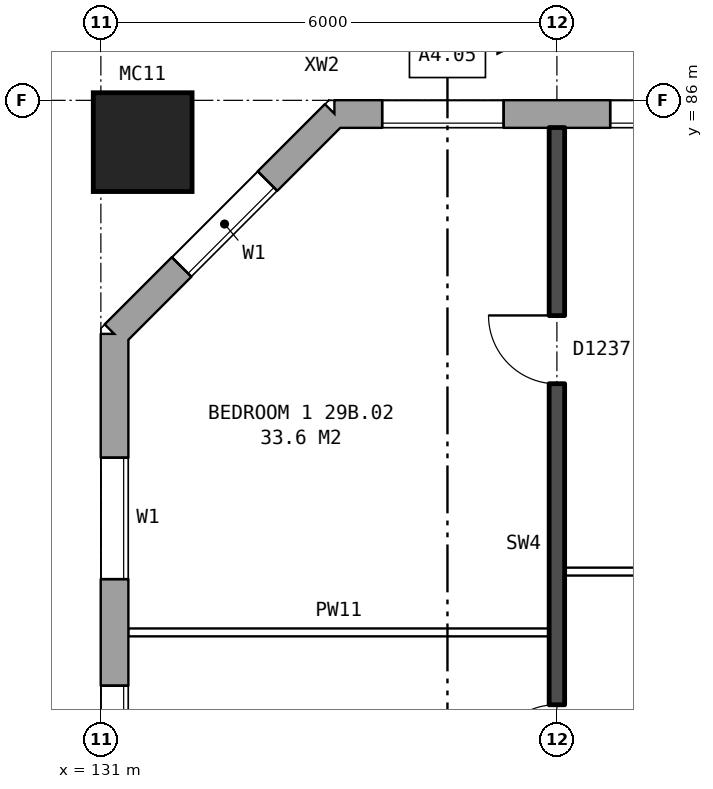
"""IFC4 building model, lengths in metres.
Left out: names, types, materials, properties, quantities, classifications, styles, units other than length and angle.
Written with IfcOpenShell. Run it as: python <this file> out.ifc"""

import sys

from ifc_helpers import new_model, si_unit, direction, frame, frame_2d, origin, origin_2d, place, context, subcontext, project, spatial, rectangle, hollow_rectangle, extrude, element, fill, save


model = new_model("IFC4")
c1 = context("Model", 3, precision=1e-05, world=origin(), true_north=direction((0.0, 1.0)))
c2 = subcontext(c1, "Body", "Model", "MODEL_VIEW")
j1 = project(units=[si_unit("LENGTHUNIT", "METRE"), si_unit("PLANEANGLEUNIT", "RADIAN")], contexts=[c1])
p1 = place(None, origin())
s1 = spatial("IfcSite", under=j1, at=p1, CompositionType="ELEMENT")
p2 = place(p1, origin())
s2 = spatial("IfcBuilding", under=s1, at=p2, CompositionType="ELEMENT")
p3 = place(p2, frame((0.0, 0.0, 105.7)))
s3 = spatial("IfcBuildingStorey", under=s2, at=p3, CompositionType="ELEMENT", Elevation=105.7)
p4 = place(p3, frame((131.55, 85.45, 0.0), z_axis=(0.0, 0.0, 1.0), x_axis=(1.0, 0.0, 0.0)))
e1 = element("IfcColumn", 1, at=p4, inside=s3, PredefinedType="COLUMN", context=c2, shape_type="SweptSolid", body=[
    extrude(hollow_rectangle(XDim=1.3, YDim=1.3, WallThickness=0.07, at=origin_2d()), origin(), (0.0, 0.0, 1.0), 3.1),
])
p5 = place(p3, frame((170.925, 85.82, 0.0), z_axis=(0.0, 0.0, 1.0), x_axis=(-1.0, 0.0, 0.0)))
e2 = element("IfcWall", 2, at=p5, inside=s3, PredefinedType="STANDARD", context=c2, shape_type="SweptSolid", body=[
    extrude(rectangle(XDim=36.851, YDim=0.36, at=frame_2d((18.425, 0.0))), origin(), (0.0, 0.0, 1.0), 2.85),
])
p6 = place(p5, frame((1.625, 0.0, 0.8)))
e3 = element("IfcOpeningElement", 3, at=p6, cuts=e2, PredefinedType="OPENING", context=c2, shape_type="SweptSolid", body=[
    extrude(rectangle(XDim=1.6, YDim=1.8, at=frame_2d((0.8, 0.9))), frame((0.0, 0.19, 0.0), z_axis=(0.0, -1.0, 0.0), x_axis=(1.0, 0.0, 0.0)), (0.0, 0.0, 1.0), 0.38),
])
p7 = place(p5, frame((4.625, 0.0, 0.8)))
e4 = element("IfcOpeningElement", 4, at=p7, cuts=e2, PredefinedType="OPENING", context=c2, shape_type="SweptSolid", body=[
    extrude(rectangle(XDim=1.6, YDim=1.8, at=frame_2d((0.8, 0.9))), frame((0.0, 0.19, 0.0), z_axis=(0.0, -1.0, 0.0), x_axis=(1.0, 0.0, 0.0)), (0.0, 0.0, 1.0), 0.38),
])
p8 = place(p5, frame((6.525, 0.0, 0.8)))
e5 = element("IfcOpeningElement", 5, at=p8, cuts=e2, PredefinedType="OPENING", context=c2, shape_type="SweptSolid", body=[
    extrude(rectangle(XDim=1.4, YDim=1.8, at=frame_2d((0.7, 0.9))), frame((0.0, 0.19, 0.0), z_axis=(0.0, -1.0, 0.0), x_axis=(1.0, 0.0, 0.0)), (0.0, 0.0, 1.0), 0.38),
])
p9 = place(p5, frame((10.675, 0.0, 0.8)))
e6 = element("IfcOpeningElement", 6, at=p9, cuts=e2, PredefinedType="OPENING", context=c2, shape_type="SweptSolid", body=[
    extrude(rectangle(XDim=0.6, YDim=0.9, at=frame_2d((0.3, 0.45))), frame((0.0, 0.19, 0.0), z_axis=(0.0, -1.0, 0.0), x_axis=(1.0, 0.0, 0.0)), (0.0, 0.0, 1.0), 0.38),
])
p10 = place(p5, frame((13.625, 0.0, 0.8)))
e7 = element("IfcOpeningElement", 7, at=p10, cuts=e2, PredefinedType="OPENING", context=c2, shape_type="SweptSolid", body=[
    extrude(rectangle(XDim=1.6, YDim=1.8, at=frame_2d((0.8, 0.9))), frame((0.0, 0.19, 0.0), z_axis=(0.0, -1.0, 0.0), x_axis=(1.0, 0.0, 0.0)), (0.0, 0.0, 1.0), 0.38),
])
p11 = place(p5, frame((16.625, 0.0, 0.8)))
e8 = element("IfcOpeningElement", 8, at=p11, cuts=e2, PredefinedType="OPENING", context=c2, shape_type="SweptSolid", body=[
    extrude(rectangle(XDim=1.6, YDim=1.8, at=frame_2d((0.8, 0.9))), frame((0.0, 0.19, 0.0), z_axis=(0.0, -1.0, 0.0), x_axis=(1.0, 0.0, 0.0)), (0.0, 0.0, 1.0), 0.38),
])
p12 = place(p5, frame((19.625, 0.0, 0.8)))
e9 = element("IfcOpeningElement", 9, at=p12, cuts=e2, PredefinedType="OPENING", context=c2, shape_type="SweptSolid", body=[
    extrude(rectangle(XDim=1.6, YDim=1.8, at=frame_2d((0.8, 0.9))), frame((0.0, 0.19, 0.0), z_axis=(0.0, -1.0, 0.0), x_axis=(1.0, 0.0, 0.0)), (0.0, 0.0, 1.0), 0.38),
])
p13 = place(p5, frame((22.625, 0.0, 0.8)))
e10 = element("IfcOpeningElement", 10, at=p13, cuts=e2, PredefinedType="OPENING", context=c2, shape_type="SweptSolid", body=[
    extrude(rectangle(XDim=1.6, YDim=1.8, at=frame_2d((0.8, 0.9))), frame((0.0, 0.19, 0.0), z_axis=(0.0, -1.0, 0.0), x_axis=(1.0, 0.0, 0.0)), (0.0, 0.0, 1.0), 0.38),
])
p14 = place(p5, frame((25.075, 0.0, 0.15)))
e11 = element("IfcOpeningElement", 11, at=p14, cuts=e2, PredefinedType="OPENING", context=c2, shape_type="SweptSolid", body=[
    extrude(rectangle(XDim=0.8, YDim=1.8, at=frame_2d((0.4, 0.9))), frame((0.0, 0.19, 0.0), z_axis=(0.0, -1.0, 0.0), x_axis=(1.0, 0.0, 0.0)), (0.0, 0.0, 1.0), 0.38),
])
p15 = place(p5, frame((28.625, 0.0, 0.8)))
e12 = element("IfcOpeningElement", 12, at=p15, cuts=e2, PredefinedType="OPENING", context=c2, shape_type="SweptSolid", body=[
    extrude(rectangle(XDim=1.6, YDim=1.8, at=frame_2d((0.8, 0.9))), frame((0.0, 0.19, 0.0), z_axis=(0.0, -1.0, 0.0), x_axis=(1.0, 0.0, 0.0)), (0.0, 0.0, 1.0), 0.38),
])
p16 = place(p5, frame((31.625, 0.0, 0.8)))
e13 = element("IfcOpeningElement", 13, at=p16, cuts=e2, PredefinedType="OPENING", context=c2, shape_type="SweptSolid", body=[
    extrude(rectangle(XDim=1.6, YDim=1.8, at=frame_2d((0.8, 0.9))), frame((0.0, 0.19, 0.0), z_axis=(0.0, -1.0, 0.0), x_axis=(1.0, 0.0, 0.0)), (0.0, 0.0, 1.0), 0.38),
])
p17 = place(p5, frame((34.625, 0.0, 0.8)))
e14 = element("IfcOpeningElement", 14, at=p17, cuts=e2, PredefinedType="OPENING", context=c2, shape_type="SweptSolid", body=[
    extrude(rectangle(XDim=1.6, YDim=1.8, at=frame_2d((0.8, 0.9))), frame((0.0, 0.19, 0.0), z_axis=(0.0, -1.0, 0.0), x_axis=(1.0, 0.0, 0.0)), (0.0, 0.0, 1.0), 0.38),
])
p18 = place(p5, frame((8.225, 0.0, 1.4)))
e15 = element("IfcOpeningElement", 15, at=p18, cuts=e2, PredefinedType="OPENING", context=c2, shape_type="SweptSolid", body=[
    extrude(rectangle(XDim=1.0, YDim=1.2, at=frame_2d((0.5, 0.6))), frame((0.0, 0.19, 0.0), z_axis=(0.0, -1.0, 0.0), x_axis=(1.0, 0.0, 0.0)), (0.0, 0.0, 1.0), 0.38),
])
p19 = place(p5, frame((11.725, 0.0, 0.8)))
e16 = element("IfcOpeningElement", 16, at=p19, cuts=e2, PredefinedType="OPENING", context=c2, shape_type="SweptSolid", body=[
    extrude(rectangle(XDim=1.6, YDim=1.8, at=frame_2d((0.8, 0.9))), frame((0.0, 0.19, 0.0), z_axis=(0.0, -1.0, 0.0), x_axis=(1.0, 0.0, 0.0)), (0.0, 0.0, 1.0), 0.38),
])
p20 = place(p5, frame((26.175, 0.0, 0.25)))
e17 = element("IfcOpeningElement", 17, at=p20, cuts=e2, PredefinedType="OPENING", context=c2, shape_type="SweptSolid", body=[
    extrude(rectangle(XDim=0.6, YDim=0.9, at=frame_2d((0.3, 0.45))), frame((0.0, 0.19, 0.0), z_axis=(0.0, -1.0, 0.0), x_axis=(1.0, 0.0, 0.0)), (0.0, 0.0, 1.0), 0.38),
])
p21 = place(p3, frame((134.075, 85.82, 0.0), z_axis=(0.0, 0.0, 1.0), x_axis=(-0.707106781187, -0.707106781187, 0.0)))
e18 = element("IfcWall", 18, at=p21, inside=s3, PredefinedType="STANDARD", context=c2, shape_type="SweptSolid", body=[
    extrude(rectangle(XDim=4.094, YDim=0.36, at=frame_2d((2.047, 0.0))), origin(), (0.0, 0.0, 1.0), 2.85),
])
p22 = place(p21, frame((1.247, 0.0, 0.8)))
e19 = element("IfcOpeningElement", 19, at=p22, cuts=e18, PredefinedType="OPENING", context=c2, shape_type="SweptSolid", body=[
    extrude(rectangle(XDim=1.6, YDim=1.8, at=frame_2d((0.8, 0.9))), frame((0.0, 0.19, 0.0), z_axis=(0.0, -1.0, 0.0), x_axis=(1.0, 0.0, 0.0)), (0.0, 0.0, 1.0), 0.38),
])
p23 = place(p3, frame((131.18, 82.925, 0.0), z_axis=(0.0, 0.0, 1.0), x_axis=(0.0, -1.0, 0.0)))
e20 = element("IfcWall", 20, at=p23, inside=s3, PredefinedType="STANDARD", context=c2, shape_type="SweptSolid", body=[
    extrude(rectangle(XDim=25.851, YDim=0.36, at=frame_2d((12.925, 0.0))), origin(), (0.0, 0.0, 1.0), 2.85),
])
p24 = place(p23, frame((1.625, 0.0, 0.8)))
e21 = element("IfcOpeningElement", 21, at=p24, cuts=e20, PredefinedType="OPENING", context=c2, shape_type="SweptSolid", body=[
    extrude(rectangle(XDim=1.6, YDim=1.8, at=frame_2d((0.8, 0.9))), frame((0.0, 0.19, 0.0), z_axis=(0.0, -1.0, 0.0), x_axis=(1.0, 0.0, 0.0)), (0.0, 0.0, 1.0), 0.38),
])
p25 = place(p23, frame((4.625, 0.0, 0.8)))
e22 = element("IfcOpeningElement", 22, at=p25, cuts=e20, PredefinedType="OPENING", context=c2, shape_type="SweptSolid", body=[
    extrude(rectangle(XDim=1.6, YDim=1.8, at=frame_2d((0.8, 0.9))), frame((0.0, 0.19, 0.0), z_axis=(0.0, -1.0, 0.0), x_axis=(1.0, 0.0, 0.0)), (0.0, 0.0, 1.0), 0.38),
])
p26 = place(p23, frame((19.625, 0.0, 0.8)))
e23 = element("IfcOpeningElement", 23, at=p26, cuts=e20, PredefinedType="OPENING", context=c2, shape_type="SweptSolid", body=[
    extrude(rectangle(XDim=1.6, YDim=1.8, at=frame_2d((0.8, 0.9))), frame((0.0, 0.19, 0.0), z_axis=(0.0, -1.0, 0.0), x_axis=(1.0, 0.0, 0.0)), (0.0, 0.0, 1.0), 0.38),
])
p27 = place(p23, frame((22.625, 0.0, 0.8)))
e24 = element("IfcOpeningElement", 24, at=p27, cuts=e20, PredefinedType="OPENING", context=c2, shape_type="SweptSolid", body=[
    extrude(rectangle(XDim=1.6, YDim=1.8, at=frame_2d((0.8, 0.9))), frame((0.0, 0.19, 0.0), z_axis=(0.0, -1.0, 0.0), x_axis=(1.0, 0.0, 0.0)), (0.0, 0.0, 1.0), 0.38),
])
p28 = place(p3, frame((131.36, 79.0, 0.0), z_axis=(0.0, 0.0, 1.0), x_axis=(1.0, 0.0, 0.0)))
e25 = element("IfcWall", 25, at=p28, inside=s3, PredefinedType="PARTITIONING", context=c2, shape_type="SweptSolid", body=[
    extrude(rectangle(XDim=5.54, YDim=0.1, at=frame_2d((2.77, 0.0))), origin(), (0.0, 0.0, 1.0), 2.85),
])
p29 = place(p3, frame((137.1, 79.8, 0.0), z_axis=(0.0, 0.0, 1.0), x_axis=(1.0, 0.0, 0.0)))
e26 = element("IfcWall", 26, at=p29, inside=s3, PredefinedType="PARTITIONING", context=c2, shape_type="SweptSolid", body=[
    extrude(rectangle(XDim=5.8, YDim=0.1, at=frame_2d((2.9, 0.0))), origin(), (0.0, 0.0, 1.0), 2.85),
])
p30 = place(p29, frame((1.3, 0.0, 0.0)))
e27 = element("IfcOpeningElement", 27, at=p30, cuts=e26, PredefinedType="OPENING", context=c2, shape_type="SweptSolid", body=[
    extrude(rectangle(XDim=0.9, YDim=2.1, at=frame_2d((0.45, 1.05))), frame((0.0, 0.06, 0.0), z_axis=(0.0, -1.0, 0.0), x_axis=(1.0, 0.0, 0.0)), (0.0, 0.0, 1.0), 0.12),
])
p31 = place(p29, frame((4.2, 0.0, 0.0)))
e28 = element("IfcOpeningElement", 28, at=p31, cuts=e26, PredefinedType="OPENING", context=c2, shape_type="SweptSolid", body=[
    extrude(rectangle(XDim=0.9, YDim=2.1, at=frame_2d((0.45, 1.05))), frame((0.0, 0.06, 0.0), z_axis=(0.0, -1.0, 0.0), x_axis=(1.0, 0.0, 0.0)), (0.0, 0.0, 1.0), 0.12),
])
p32 = place(p3, frame((137.0, 76.2, 0.0), z_axis=(0.0, 0.0, 1.0), x_axis=(0.0, 1.0, 0.0)))
e29 = element("IfcWall", 29, at=p32, inside=s3, PredefinedType="SOLIDWALL", context=c2, shape_type="SweptSolid", body=[
    extrude(rectangle(XDim=9.44, YDim=0.2, at=frame_2d((4.72, 0.0))), origin(), (0.0, 0.0, 1.0), 2.85),
])
p33 = place(p32, frame((6.07, 0.0, 0.0)))
e30 = element("IfcOpeningElement", 30, at=p33, cuts=e29, PredefinedType="OPENING", context=c2, shape_type="SweptSolid", body=[
    extrude(rectangle(XDim=0.9, YDim=2.1, at=frame_2d((0.45, 1.05))), frame((0.0, 0.11, 0.0), z_axis=(0.0, -1.0, 0.0), x_axis=(1.0, 0.0, 0.0)), (0.0, 0.0, 1.0), 0.22),
])
p34 = place(p32, frame((0.95, 0.0, 0.0)))
e31 = element("IfcOpeningElement", 31, at=p34, cuts=e29, PredefinedType="OPENING", context=c2, shape_type="SweptSolid", body=[
    extrude(rectangle(XDim=0.9, YDim=2.1, at=frame_2d((0.45, 1.05))), frame((0.0, 0.11, 0.0), z_axis=(0.0, -1.0, 0.0), x_axis=(1.0, 0.0, 0.0)), (0.0, 0.0, 1.0), 0.22),
])
p35 = place(p16, origin())
e32 = element("IfcWindow", 32, at=p35, inside=s3, PartitioningType="SINGLE_PANEL", PredefinedType="WINDOW", context=c2, shape_type="SweptSolid", body=[
    extrude(rectangle(XDim=1.6, YDim=1.8, at=frame_2d((0.8, 0.9))), frame((0.0, 0.15, 0.0), z_axis=(0.0, -1.0, 0.0), x_axis=(1.0, 0.0, 0.0)), (0.0, 0.0, 1.0), 0.06),
])
fill(e13, e32)
p36 = place(p17, origin())
e33 = element("IfcWindow", 33, at=p36, inside=s3, PartitioningType="SINGLE_PANEL", PredefinedType="WINDOW", context=c2, shape_type="SweptSolid", body=[
    extrude(rectangle(XDim=1.6, YDim=1.8, at=frame_2d((0.8, 0.9))), frame((0.0, 0.15, 0.0), z_axis=(0.0, -1.0, 0.0), x_axis=(1.0, 0.0, 0.0)), (0.0, 0.0, 1.0), 0.06),
])
fill(e14, e33)
p37 = place(p22, origin())
e34 = element("IfcWindow", 34, at=p37, inside=s3, PartitioningType="SINGLE_PANEL", PredefinedType="WINDOW", context=c2, shape_type="SweptSolid", body=[
    extrude(rectangle(XDim=1.6, YDim=1.8, at=frame_2d((0.8, 0.9))), frame((0.0, 0.15, 0.0), z_axis=(0.0, -1.0, 0.0), x_axis=(1.0, 0.0, 0.0)), (0.0, 0.0, 1.0), 0.06),
])
fill(e19, e34)
p38 = place(p24, origin())
e35 = element("IfcWindow", 35, at=p38, inside=s3, PartitioningType="SINGLE_PANEL", PredefinedType="WINDOW", context=c2, shape_type="SweptSolid", body=[
    extrude(rectangle(XDim=1.6, YDim=1.8, at=frame_2d((0.8, 0.9))), frame((0.0, 0.15, 0.0), z_axis=(0.0, -1.0, 0.0), x_axis=(1.0, 0.0, 0.0)), (0.0, 0.0, 1.0), 0.06),
])
fill(e21, e35)
p39 = place(p25, origin())
e36 = element("IfcWindow", 36, at=p39, inside=s3, PartitioningType="SINGLE_PANEL", PredefinedType="WINDOW", context=c2, shape_type="SweptSolid", body=[
    extrude(rectangle(XDim=1.6, YDim=1.8, at=frame_2d((0.8, 0.9))), frame((0.0, 0.15, 0.0), z_axis=(0.0, -1.0, 0.0), x_axis=(1.0, 0.0, 0.0)), (0.0, 0.0, 1.0), 0.06),
])
fill(e22, e36)
p40 = place(p33, origin())
e37 = element("IfcDoor", 37, at=p40, inside=s3, OperationType="SINGLE_SWING_RIGHT", PredefinedType="DOOR", context=c2, shape_type="SweptSolid", body=[
    extrude(rectangle(XDim=0.9, YDim=2.1, at=frame_2d((0.45, 1.05))), frame((0.0, 0.025, 0.0), z_axis=(0.0, -1.0, 0.0), x_axis=(1.0, 0.0, 0.0)), (0.0, 0.0, 1.0), 0.05),
])
fill(e30, e37)
p41 = place(p34, origin())
e38 = element("IfcDoor", 38, at=p41, inside=s3, OperationType="SINGLE_SWING_LEFT", PredefinedType="DOOR", context=c2, shape_type="SweptSolid", body=[
    extrude(rectangle(XDim=0.9, YDim=2.1, at=frame_2d((0.45, 1.05))), frame((0.0, 0.025, 0.0), z_axis=(0.0, -1.0, 0.0), x_axis=(1.0, 0.0, 0.0)), (0.0, 0.0, 1.0), 0.05),
])
fill(e31, e38)
save(model, sys.argv[1])
